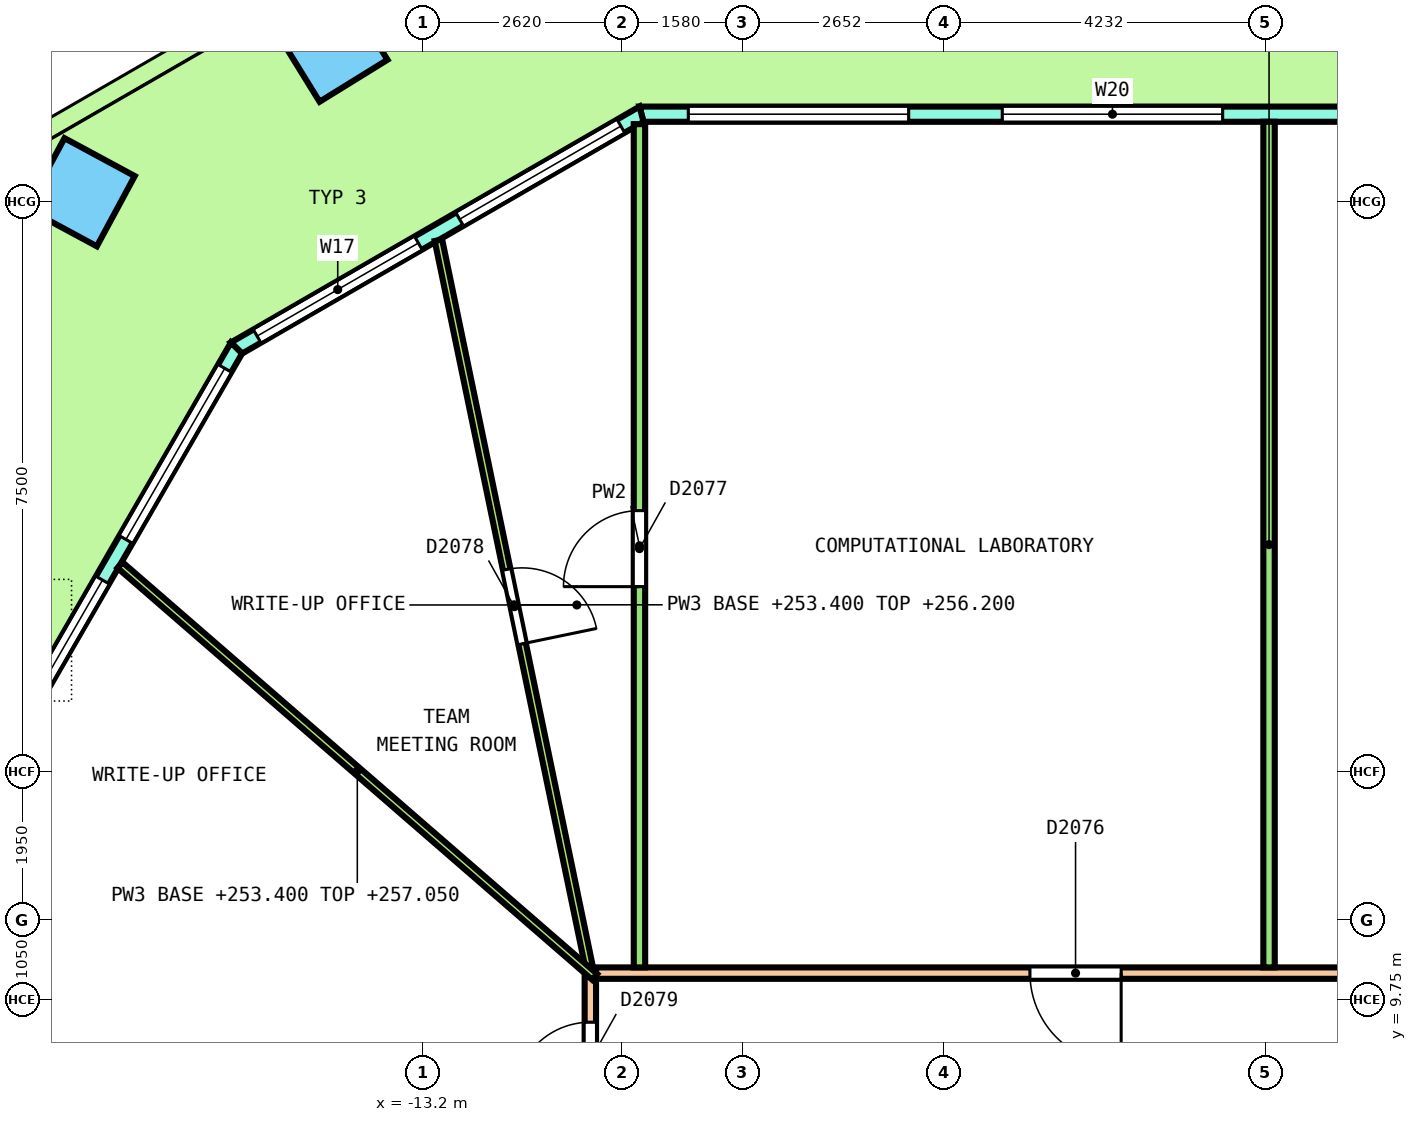
"""IFC4 building model, lengths in metres.
Left out: names, types, materials, properties, quantities, classifications, styles, units other than length and angle.
Written with IfcOpenShell. Run it as: python <this file> out.ifc"""

import sys

from ifc_helpers import new_model, si_unit, direction, frame, frame_2d, origin, origin_2d, place, context, subcontext, project, spatial, polyline, rectangle, outline, extrude, element, fill, save


model = new_model("IFC4")
c1 = context("Model", 3, precision=1e-05, world=origin(), true_north=direction((0.0, 1.0)))
c2 = subcontext(c1, "Body", "Model", "MODEL_VIEW")
j1 = project(units=[si_unit("LENGTHUNIT", "METRE"), si_unit("PLANEANGLEUNIT", "RADIAN")], contexts=[c1])
p1 = place(None, origin())
s1 = spatial("IfcSite", under=j1, at=p1, CompositionType="ELEMENT")
p2 = place(p1, origin())
s2 = spatial("IfcBuilding", under=s1, at=p2, CompositionType="ELEMENT")
p3 = place(p2, frame((0.0, 0.0, 253.4)))
s3 = spatial("IfcBuildingStorey", under=s2, at=p3, CompositionType="ELEMENT", Elevation=253.4)
for number, where, z_axis, x_axis in (
    (1, (-14.391, 22.287, 0.0), (0.356, 0.0, 0.934), (-0.795, -0.526, 0.303)),
    (2, (-17.705, 20.373, 0.0), (0.356, 0.0, 0.934), (-0.444, -0.88, 0.169)),
):
    element("IfcColumn", number, at=place(p3, frame(where, z_axis=z_axis, x_axis=x_axis)), inside=s3, PredefinedType="COLUMN", context=c2, shape_type="SweptSolid", body=[
        extrude(rectangle(XDim=1.05, YDim=1.05, at=origin_2d()), origin(), (0.0, 0.0, 1.0), 3.896),
    ])
p4 = place(p3, frame((-19.464, 17.328, 0.0), z_axis=(0.32375212642, -0.062242976779, 0.944092353788), x_axis=(-0.467676932124, -0.87793666496, 0.102496338853)))
e3 = element("IfcColumn", 3, at=p4, inside=s3, PredefinedType="COLUMN", context=c2, shape_type="SweptSolid", body=[
    extrude(rectangle(XDim=1.05, YDim=1.05, at=origin_2d()), origin(), (0.0, 0.0, 1.0), 3.856),
])
p5 = place(p3, frame((10.327, 21.4, 0.0), z_axis=(0.0, 0.0, 1.0), x_axis=(-1.0, 0.0, 0.0)))
e4 = element("IfcWall", 4, at=p5, inside=s3, PredefinedType="SOLIDWALL", context=c2, shape_type="SweptSolid", body=[
    extrude(outline(polyline([(-0.027, -0.1), (1.009, -0.1), (2.044, -0.1), (3.079, -0.1), (4.115, -0.1), (5.15, -0.1), (6.185, -0.1), (7.221, -0.1), (8.256, -0.1), (9.292, -0.1), (10.327, -0.1), (11.362, -0.1), (12.398, -0.1), (13.433, -0.1), (14.469, -0.1), (15.504, -0.1), (16.539, -0.1), (17.574, -0.1), (18.61, -0.1), (19.645, -0.1), (20.681, -0.1), (20.627, 0.1), (19.597, 0.1), (18.567, 0.1), (17.537, 0.1), (16.507, 0.1), (15.477, 0.1), (14.447, 0.1), (13.417, 0.1), (12.387, 0.1), (11.357, 0.1), (10.327, 0.1), (9.297, 0.1), (8.267, 0.1), (7.237, 0.1), (6.207, 0.1), (5.177, 0.1), (4.147, 0.1), (3.117, 0.1), (2.087, 0.1), (1.057, 0.1), (0.027, 0.1), (-0.027, -0.1)])), origin(), (0.0, 0.0, 1.0), 3.7),
])
p6 = place(p5, frame((0.615, 0.0, 0.1)))
e5 = element("IfcOpeningElement", 5, at=p6, cuts=e4, PredefinedType="OPENING", context=c2, shape_type="SweptSolid", body=[
    extrude(rectangle(XDim=2.9, YDim=2.65, at=frame_2d((1.45, 1.325))), frame((0.0, 0.11, 0.0), z_axis=(0.0, -1.0, 0.0), x_axis=(1.0, 0.0, 0.0)), (0.0, 0.0, 1.0), 0.22),
])
p7 = place(p5, frame((4.746, 0.0, 0.1)))
e6 = element("IfcOpeningElement", 6, at=p7, cuts=e4, PredefinedType="OPENING", context=c2, shape_type="SweptSolid", body=[
    extrude(rectangle(XDim=2.9, YDim=2.65, at=frame_2d((1.45, 1.325))), frame((0.0, 0.11, 0.0), z_axis=(0.0, -1.0, 0.0), x_axis=(1.0, 0.0, 0.0)), (0.0, 0.0, 1.0), 0.22),
])
p8 = place(p5, frame((9.427, 0.0, 0.0)))
e7 = element("IfcOpeningElement", 7, at=p8, cuts=e4, PredefinedType="OPENING", context=c2, shape_type="SweptSolid", body=[
    extrude(rectangle(XDim=1.8, YDim=2.4, at=frame_2d((0.9, 1.2))), frame((0.0, 0.11, 0.0), z_axis=(0.0, -1.0, 0.0), x_axis=(1.0, 0.0, 0.0)), (0.0, 0.0, 1.0), 0.22),
])
p9 = place(p5, frame((9.427, 0.0, 2.55)))
e8 = element("IfcOpeningElement", 8, at=p9, cuts=e4, PredefinedType="OPENING", context=c2, shape_type="SweptSolid", body=[
    extrude(rectangle(XDim=1.8, YDim=0.2, at=frame_2d((0.9, 0.1))), frame((0.0, 0.11, 0.0), z_axis=(0.0, -1.0, 0.0), x_axis=(1.0, 0.0, 0.0)), (0.0, 0.0, 1.0), 0.22),
])
p10 = place(p5, frame((13.008, 0.0, 0.1)))
e9 = element("IfcOpeningElement", 9, at=p10, cuts=e4, PredefinedType="OPENING", context=c2, shape_type="SweptSolid", body=[
    extrude(rectangle(XDim=2.9, YDim=2.65, at=frame_2d((1.45, 1.325))), frame((0.0, 0.11, 0.0), z_axis=(0.0, -1.0, 0.0), x_axis=(1.0, 0.0, 0.0)), (0.0, 0.0, 1.0), 0.22),
])
p11 = place(p5, frame((17.139, 0.0, 0.1)))
e10 = element("IfcOpeningElement", 10, at=p11, cuts=e4, PredefinedType="OPENING", context=c2, shape_type="SweptSolid", body=[
    extrude(rectangle(XDim=2.9, YDim=2.65, at=frame_2d((1.45, 1.325))), frame((0.0, 0.11, 0.0), z_axis=(0.0, -1.0, 0.0), x_axis=(1.0, 0.0, 0.0)), (0.0, 0.0, 1.0), 0.22),
])
p12 = place(p3, frame((-10.327, 21.4, 0.0), z_axis=(0.0, 0.0, 1.0), x_axis=(-0.866029647142, -0.499992650217, 0.0)))
e11 = element("IfcWall", 11, at=p12, inside=s3, PredefinedType="SOLIDWALL", context=c2, shape_type="SweptSolid", body=[
    extrude(outline(polyline([(-0.027, -0.1), (1.008, -0.1), (2.042, -0.1), (3.076, -0.1), (4.111, -0.1), (5.145, -0.1), (6.18, -0.1), (6.126, 0.1), (5.109, 0.1), (4.093, 0.1), (3.076, 0.1), (2.06, 0.1), (1.043, 0.1), (0.027, 0.1), (-0.027, -0.1)])), origin(), (0.0, 0.0, 1.0), 3.7),
])
p13 = place(p12, frame((0.313, 0.0, 0.1)))
e12 = element("IfcOpeningElement", 12, at=p13, cuts=e11, PredefinedType="OPENING", context=c2, shape_type="SweptSolid", body=[
    extrude(rectangle(XDim=2.45, YDim=2.65, at=frame_2d((1.225, 1.325))), frame((0.0, 0.11, 0.0), z_axis=(0.0, -1.0, 0.0), x_axis=(1.0, 0.0, 0.0)), (0.0, 0.0, 1.0), 0.22),
])
p14 = place(p12, frame((3.39, 0.0, 0.1)))
e13 = element("IfcOpeningElement", 13, at=p14, cuts=e11, PredefinedType="OPENING", context=c2, shape_type="SweptSolid", body=[
    extrude(rectangle(XDim=2.45, YDim=2.65, at=frame_2d((1.225, 1.325))), frame((0.0, 0.11, 0.0), z_axis=(0.0, -1.0, 0.0), x_axis=(1.0, 0.0, 0.0)), (0.0, 0.0, 1.0), 0.22),
])
p15 = place(p3, frame((-15.656, 18.323, 0.0), z_axis=(0.0, 0.0, 1.0), x_axis=(-0.500000613642, -0.866025049498, 0.0)))
e14 = element("IfcWall", 14, at=p15, inside=s3, PredefinedType="SOLIDWALL", context=c2, shape_type="SweptSolid", body=[
    extrude(outline(polyline([(-0.027, -0.1), (0.982, -0.1), (1.99, -0.1), (2.999, -0.1), (4.007, -0.1), (5.015, -0.1), (6.024, -0.1), (7.032, -0.1), (8.041, -0.1), (9.049, -0.1), (10.058, -0.1), (11.066, -0.1), (12.075, -0.1), (13.083, -0.1), (14.092, -0.1), (15.1, -0.1), (16.108, -0.1), (16.055, 0.1), (15.053, 0.1), (14.051, 0.1), (13.05, 0.1), (12.048, 0.1), (11.046, 0.1), (10.044, 0.1), (9.042, 0.1), (8.041, 0.1), (7.039, 0.1), (6.037, 0.1), (5.036, 0.1), (4.034, 0.1), (3.032, 0.1), (2.03, 0.1), (1.029, 0.1), (0.027, 0.1), (-0.027, -0.1)])), origin(), (0.0, 0.0, 1.0), 3.7),
])
p16 = place(p15, frame((0.308, 0.0, 0.1)))
e15 = element("IfcOpeningElement", 15, at=p16, cuts=e14, PredefinedType="OPENING", context=c2, shape_type="SweptSolid", body=[
    extrude(rectangle(XDim=2.6, YDim=2.65, at=frame_2d((1.3, 1.325))), frame((0.0, 0.11, 0.0), z_axis=(0.0, -1.0, 0.0), x_axis=(1.0, 0.0, 0.0)), (0.0, 0.0, 1.0), 0.22),
])
p17 = place(p15, frame((3.524, 0.0, 0.1)))
e16 = element("IfcOpeningElement", 16, at=p17, cuts=e14, PredefinedType="OPENING", context=c2, shape_type="SweptSolid", body=[
    extrude(rectangle(XDim=2.6, YDim=2.65, at=frame_2d((1.3, 1.325))), frame((0.0, 0.11, 0.0), z_axis=(0.0, -1.0, 0.0), x_axis=(1.0, 0.0, 0.0)), (0.0, 0.0, 1.0), 0.22),
])
p18 = place(p15, frame((7.141, 0.0, 0.0)))
e17 = element("IfcOpeningElement", 17, at=p18, cuts=e14, PredefinedType="OPENING", context=c2, shape_type="SweptSolid", body=[
    extrude(rectangle(XDim=1.8, YDim=2.4, at=frame_2d((0.9, 1.2))), frame((0.0, 0.11, 0.0), z_axis=(0.0, -1.0, 0.0), x_axis=(1.0, 0.0, 0.0)), (0.0, 0.0, 1.0), 0.22),
])
p19 = place(p15, frame((7.141, 0.0, 2.55)))
e18 = element("IfcOpeningElement", 18, at=p19, cuts=e14, PredefinedType="OPENING", context=c2, shape_type="SweptSolid", body=[
    extrude(rectangle(XDim=1.8, YDim=0.2, at=frame_2d((0.9, 0.1))), frame((0.0, 0.11, 0.0), z_axis=(0.0, -1.0, 0.0), x_axis=(1.0, 0.0, 0.0)), (0.0, 0.0, 1.0), 0.22),
])
p20 = place(p15, frame((9.957, 0.0, 0.1)))
e19 = element("IfcOpeningElement", 19, at=p20, cuts=e14, PredefinedType="OPENING", context=c2, shape_type="SweptSolid", body=[
    extrude(rectangle(XDim=2.6, YDim=2.65, at=frame_2d((1.3, 1.325))), frame((0.0, 0.11, 0.0), z_axis=(0.0, -1.0, 0.0), x_axis=(1.0, 0.0, 0.0)), (0.0, 0.0, 1.0), 0.22),
])
p21 = place(p15, frame((13.174, 0.0, 0.1)))
e20 = element("IfcOpeningElement", 20, at=p21, cuts=e14, PredefinedType="OPENING", context=c2, shape_type="SweptSolid", body=[
    extrude(rectangle(XDim=2.6, YDim=2.65, at=frame_2d((1.3, 1.325))), frame((0.0, 0.11, 0.0), z_axis=(0.0, -1.0, 0.0), x_axis=(1.0, 0.0, 0.0)), (0.0, 0.0, 1.0), 0.22),
])
p22 = place(p3, frame((-10.925, 10.1, 0.0), z_axis=(0.0, 0.0, 1.0), x_axis=(1.0, 0.0, 0.0)))
e21 = element("IfcWall", 21, at=p22, inside=s3, PredefinedType="PARTITIONING", context=c2, shape_type="SweptSolid", body=[
    extrude(rectangle(XDim=21.875, YDim=0.15, at=frame_2d((10.938, 0.0))), origin(), (0.0, 0.0, 1.0), 2.8),
])
p23 = place(p22, frame((18.568, 0.0, 0.0)))
e22 = element("IfcOpeningElement", 22, at=p23, cuts=e21, PredefinedType="OPENING", context=c2, shape_type="SweptSolid", body=[
    extrude(rectangle(XDim=1.0, YDim=2.1, at=frame_2d((0.5, 1.05))), frame((0.0, 0.085, 0.0), z_axis=(0.0, -1.0, 0.0), x_axis=(1.0, 0.0, 0.0)), (0.0, 0.0, 1.0), 0.17),
])
p24 = place(p22, frame((10.85, 0.0, 0.0)))
e23 = element("IfcOpeningElement", 23, at=p24, cuts=e21, PredefinedType="OPENING", context=c2, shape_type="SweptSolid", body=[
    extrude(rectangle(XDim=1.0, YDim=2.1, at=frame_2d((0.5, 1.05))), frame((0.0, 0.085, 0.0), z_axis=(0.0, -1.0, 0.0), x_axis=(1.0, 0.0, 0.0)), (0.0, 0.0, 1.0), 0.17),
])
p25 = place(p22, frame((5.708, 0.0, 0.0)))
e24 = element("IfcOpeningElement", 24, at=p25, cuts=e21, PredefinedType="OPENING", context=c2, shape_type="SweptSolid", body=[
    extrude(rectangle(XDim=1.2, YDim=2.1, at=frame_2d((0.6, 1.05))), frame((0.0, 0.085, 0.0), z_axis=(0.0, -1.0, 0.0), x_axis=(1.0, 0.0, 0.0)), (0.0, 0.0, 1.0), 0.17),
])
p26 = place(p3, frame((-11.0, -7.225, 0.0), z_axis=(0.0, 0.0, 1.0), x_axis=(0.0, 1.0, 0.0)))
e25 = element("IfcWall", 25, at=p26, inside=s3, PredefinedType="PARTITIONING", context=c2, shape_type="SweptSolid", body=[
    extrude(rectangle(XDim=17.275, YDim=0.15, at=frame_2d((8.638, 0.0))), origin(), (0.0, 0.0, 1.0), 2.8),
])
p27 = place(p26, frame((15.679, 0.0, 0.0)))
e26 = element("IfcOpeningElement", 26, at=p27, cuts=e25, PredefinedType="OPENING", context=c2, shape_type="SweptSolid", body=[
    extrude(rectangle(XDim=1.0, YDim=2.1, at=frame_2d((0.5, 1.05))), frame((0.0, 0.085, 0.0), z_axis=(0.0, -1.0, 0.0), x_axis=(1.0, 0.0, 0.0)), (0.0, 0.0, 1.0), 0.17),
])
p28 = place(p26, frame((12.381, 0.0, 0.0)))
e27 = element("IfcOpeningElement", 27, at=p28, cuts=e25, PredefinedType="OPENING", context=c2, shape_type="SweptSolid", body=[
    extrude(rectangle(XDim=1.0, YDim=2.1, at=frame_2d((0.5, 1.05))), frame((0.0, 0.085, 0.0), z_axis=(0.0, -1.0, 0.0), x_axis=(1.0, 0.0, 0.0)), (0.0, 0.0, 1.0), 0.17),
])
p29 = place(p26, frame((9.947, 0.0, 0.0)))
e28 = element("IfcOpeningElement", 28, at=p29, cuts=e25, PredefinedType="OPENING", context=c2, shape_type="SweptSolid", body=[
    extrude(rectangle(XDim=1.0, YDim=2.1, at=frame_2d((0.5, 1.05))), frame((0.0, 0.085, 0.0), z_axis=(0.0, -1.0, 0.0), x_axis=(1.0, 0.0, 0.0)), (0.0, 0.0, 1.0), 0.17),
])
p30 = place(p26, frame((6.283, 0.0, 0.0)))
e29 = element("IfcOpeningElement", 29, at=p30, cuts=e25, PredefinedType="OPENING", context=c2, shape_type="SweptSolid", body=[
    extrude(rectangle(XDim=1.0, YDim=2.1, at=frame_2d((0.5, 1.05))), frame((0.0, 0.085, 0.0), z_axis=(0.0, -1.0, 0.0), x_axis=(1.0, 0.0, 0.0)), (0.0, 0.0, 1.0), 0.17),
])
p31 = place(p3, frame((-2.071, 10.175, 0.0), z_axis=(0.0, 0.0, 1.0), x_axis=(0.0, 1.0, 0.0)))
e30 = element("IfcWall", 30, at=p31, inside=s3, PredefinedType="PARTITIONING", context=c2, shape_type="SweptSolid", body=[
    extrude(rectangle(XDim=11.125, YDim=0.15, at=frame_2d((5.562, 0.0))), origin(), (0.0, 0.0, 1.0), 3.65),
])
p32 = place(p3, frame((-10.354, 10.175, 0.0), z_axis=(0.0, 0.0, 1.0), x_axis=(0.0, 1.0, 0.0)))
e31 = element("IfcWall", 31, at=p32, inside=s3, PredefinedType="PARTITIONING", context=c2, shape_type="SweptSolid", body=[
    extrude(rectangle(XDim=11.094, YDim=0.15, at=frame_2d((5.547, 0.0))), origin(), (0.0, 0.0, 1.0), 2.8),
])
p33 = place(p32, frame((5.01, 0.0, 0.0)))
e32 = element("IfcOpeningElement", 32, at=p33, cuts=e31, PredefinedType="OPENING", context=c2, shape_type="SweptSolid", body=[
    extrude(rectangle(XDim=1.0, YDim=2.1, at=frame_2d((0.5, 1.05))), frame((0.0, 0.085, 0.0), z_axis=(0.0, -1.0, 0.0), x_axis=(1.0, 0.0, 0.0)), (0.0, 0.0, 1.0), 0.17),
])
p34 = place(p3, frame((-12.999, 19.742, 0.0), z_axis=(0.0, 0.0, 1.0), x_axis=(0.202968982268, -0.979185167492, 0.0)))
e33 = element("IfcWall", 33, at=p34, inside=s3, PredefinedType="PARTITIONING", context=c2, shape_type="SweptSolid", body=[
    extrude(rectangle(XDim=9.797, YDim=0.1, at=frame_2d((4.898, 0.0))), origin(), (0.0, 0.0, 1.0), 2.8),
])
p35 = place(p34, frame((4.424, 0.0, 0.0)))
e34 = element("IfcOpeningElement", 34, at=p35, cuts=e33, PredefinedType="OPENING", context=c2, shape_type="SweptSolid", body=[
    extrude(rectangle(XDim=1.0, YDim=2.1, at=frame_2d((0.5, 1.05))), frame((0.0, 0.06, 0.0), z_axis=(0.0, -1.0, 0.0), x_axis=(1.0, 0.0, 0.0)), (0.0, 0.0, 1.0), 0.12),
])
p36 = place(p3, frame((-17.188, 15.469, 0.0), z_axis=(0.0, 0.0, 1.0), x_axis=(0.75537233605, -0.655295836954, 0.0)))
e35 = element("IfcWall", 35, at=p36, inside=s3, PredefinedType="PARTITIONING", context=c2, shape_type="SweptSolid", body=[
    extrude(rectangle(XDim=8.268, YDim=0.1, at=frame_2d((4.134, 0.0))), origin(), (0.0, 0.0, 1.0), 3.65),
])
p37 = place(p10, origin())
e36 = element("IfcWindow", 36, at=p37, inside=s3, PartitioningType="SINGLE_PANEL", PredefinedType="WINDOW", context=c2, shape_type="SweptSolid", body=[
    extrude(rectangle(XDim=2.9, YDim=2.65, at=frame_2d((1.45, 1.325))), frame((0.0, 0.03, 0.0), z_axis=(0.0, -1.0, 0.0), x_axis=(1.0, 0.0, 0.0)), (0.0, 0.0, 1.0), 0.06),
])
fill(e9, e36)
p38 = place(p11, origin())
e37 = element("IfcWindow", 37, at=p38, inside=s3, PartitioningType="SINGLE_PANEL", PredefinedType="WINDOW", context=c2, shape_type="SweptSolid", body=[
    extrude(rectangle(XDim=2.9, YDim=2.65, at=frame_2d((1.45, 1.325))), frame((0.0, 0.03, 0.0), z_axis=(0.0, -1.0, 0.0), x_axis=(1.0, 0.0, 0.0)), (0.0, 0.0, 1.0), 0.06),
])
fill(e10, e37)
p39 = place(p13, origin())
e38 = element("IfcWindow", 38, at=p39, inside=s3, PartitioningType="SINGLE_PANEL", PredefinedType="WINDOW", context=c2, shape_type="SweptSolid", body=[
    extrude(rectangle(XDim=2.45, YDim=2.65, at=frame_2d((1.225, 1.325))), frame((0.0, 0.03, 0.0), z_axis=(0.0, -1.0, 0.0), x_axis=(1.0, 0.0, 0.0)), (0.0, 0.0, 1.0), 0.06),
])
fill(e12, e38)
p40 = place(p14, origin())
e39 = element("IfcWindow", 39, at=p40, inside=s3, PartitioningType="SINGLE_PANEL", PredefinedType="WINDOW", context=c2, shape_type="SweptSolid", body=[
    extrude(rectangle(XDim=2.45, YDim=2.65, at=frame_2d((1.225, 1.325))), frame((0.0, 0.03, 0.0), z_axis=(0.0, -1.0, 0.0), x_axis=(1.0, 0.0, 0.0)), (0.0, 0.0, 1.0), 0.06),
])
fill(e13, e39)
p41 = place(p16, origin())
e40 = element("IfcWindow", 40, at=p41, inside=s3, PartitioningType="SINGLE_PANEL", PredefinedType="WINDOW", context=c2, shape_type="SweptSolid", body=[
    extrude(rectangle(XDim=2.6, YDim=2.65, at=frame_2d((1.3, 1.325))), frame((0.0, 0.03, 0.0), z_axis=(0.0, -1.0, 0.0), x_axis=(1.0, 0.0, 0.0)), (0.0, 0.0, 1.0), 0.06),
])
fill(e15, e40)
p42 = place(p17, origin())
e41 = element("IfcWindow", 41, at=p42, inside=s3, PartitioningType="SINGLE_PANEL", PredefinedType="WINDOW", context=c2, shape_type="SweptSolid", body=[
    extrude(rectangle(XDim=2.6, YDim=2.65, at=frame_2d((1.3, 1.325))), frame((0.0, 0.03, 0.0), z_axis=(0.0, -1.0, 0.0), x_axis=(1.0, 0.0, 0.0)), (0.0, 0.0, 1.0), 0.06),
])
fill(e16, e41)
p43 = place(p25, origin())
e42 = element("IfcDoor", 42, at=p43, inside=s3, OperationType="DOUBLE_DOOR_SINGLE_SWING", PredefinedType="DOOR", context=c2, shape_type="SweptSolid", body=[
    extrude(rectangle(XDim=1.2, YDim=2.1, at=frame_2d((0.6, 1.05))), frame((0.0, 0.025, 0.0), z_axis=(0.0, -1.0, 0.0), x_axis=(1.0, 0.0, 0.0)), (0.0, 0.0, 1.0), 0.05),
])
fill(e24, e42)
p44 = place(p33, origin())
e43 = element("IfcDoor", 43, at=p44, inside=s3, OperationType="SINGLE_SWING_LEFT", PredefinedType="DOOR", context=c2, shape_type="SweptSolid", body=[
    extrude(rectangle(XDim=1.0, YDim=2.1, at=frame_2d((0.5, 1.05))), frame((0.0, 0.025, 0.0), z_axis=(0.0, -1.0, 0.0), x_axis=(1.0, 0.0, 0.0)), (0.0, 0.0, 1.0), 0.05),
])
fill(e32, e43)
p45 = place(p35, origin())
e44 = element("IfcDoor", 44, at=p45, inside=s3, OperationType="SINGLE_SWING_RIGHT", PredefinedType="DOOR", context=c2, shape_type="SweptSolid", body=[
    extrude(rectangle(XDim=1.0, YDim=2.1, at=frame_2d((0.5, 1.05))), frame((0.0, 0.025, 0.0), z_axis=(0.0, -1.0, 0.0), x_axis=(1.0, 0.0, 0.0)), (0.0, 0.0, 1.0), 0.05),
])
fill(e34, e44)
p46 = place(p27, origin())
e45 = element("IfcDoor", 45, at=p46, inside=s3, OperationType="SINGLE_SWING_RIGHT", PredefinedType="DOOR", context=c2, shape_type="SweptSolid", body=[
    extrude(rectangle(XDim=1.0, YDim=2.1, at=frame_2d((0.5, 1.05))), frame((0.0, 0.025, 0.0), z_axis=(0.0, -1.0, 0.0), x_axis=(1.0, 0.0, 0.0)), (0.0, 0.0, 1.0), 0.05),
])
fill(e26, e45)
save(model, sys.argv[1])
